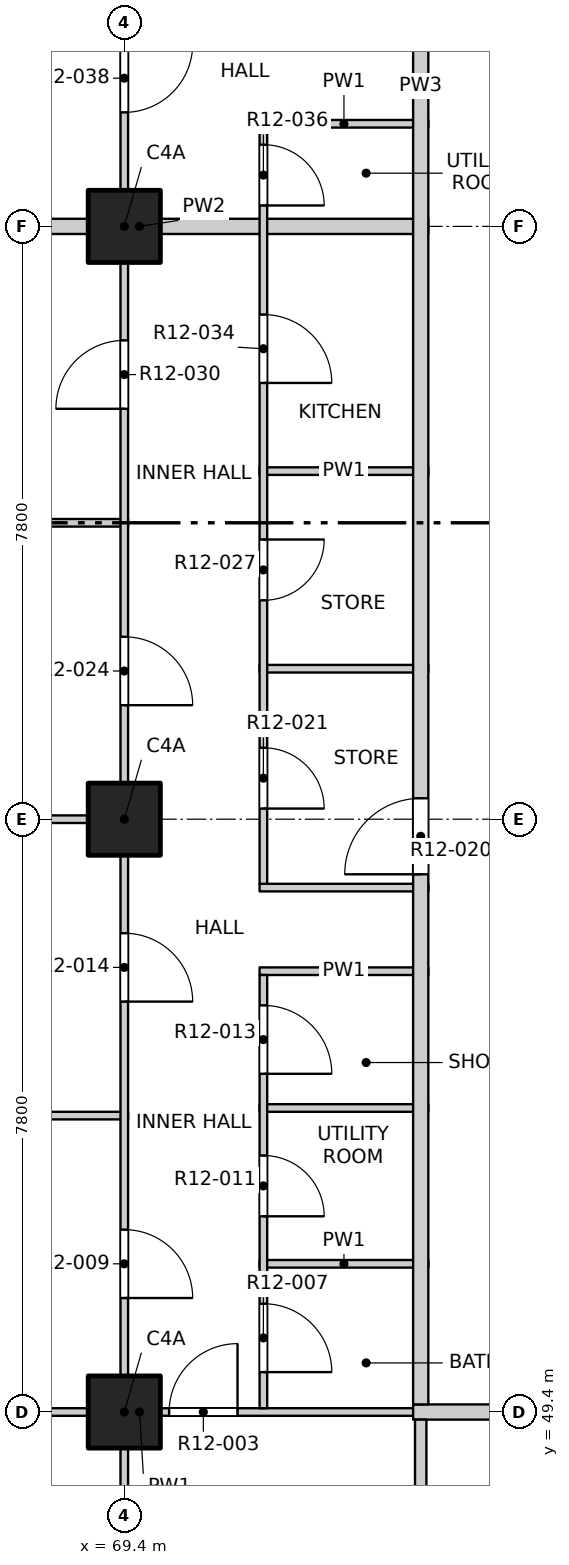
"""IFC4 building model, lengths in metres.
Left out: names, types, materials, properties, quantities, classifications, styles, units other than length and angle.
Written with IfcOpenShell. Run it as: python <this file> out.ifc"""

import sys

from ifc_helpers import new_model, si_unit, direction, frame, frame_2d, origin, origin_2d, place, context, subcontext, project, spatial, rectangle, extrude, element, fill, save


model = new_model("IFC4")
c1 = context("Model", 3, precision=1e-05, world=origin(), true_north=direction((0.0, 1.0)))
c2 = subcontext(c1, "Body", "Model", "MODEL_VIEW")
j1 = project(units=[si_unit("LENGTHUNIT", "METRE"), si_unit("PLANEANGLEUNIT", "RADIAN")], contexts=[c1])
p1 = place(None, origin())
s1 = spatial("IfcSite", under=j1, at=p1, CompositionType="ELEMENT")
p2 = place(p1, origin())
s2 = spatial("IfcBuilding", under=s1, at=p2, CompositionType="ELEMENT")
p3 = place(p2, frame((0.0, 0.0, 137.3)))
s3 = spatial("IfcBuildingStorey", under=s2, at=p3, CompositionType="ELEMENT", Elevation=137.3)
for number, where, z_axis, x_axis in (
    (1, (69.4, 49.4, -0.25), (0.0, 0.0, 1.0), (1.0, 0.0, 0.0)),
    (2, (69.4, 57.2, -0.25), (0.0, 0.0, 1.0), (1.0, 0.0, 0.0)),
    (3, (69.4, 65.0, -0.25), (0.0, 0.0, 1.0), (1.0, 0.0, 0.0)),
):
    element("IfcColumn", number, at=place(p3, frame(where, z_axis=z_axis, x_axis=x_axis)), inside=s3, PredefinedType="COLUMN", context=c2, shape_type="SweptSolid", body=[
        extrude(rectangle(XDim=0.95, YDim=0.95, at=origin_2d()), origin(), (0.0, 0.0, 1.0), 3.4),
    ])
p4 = place(p3, frame((65.8, 49.4, 0.0), z_axis=(0.0, 0.0, 1.0), x_axis=(1.0, 0.0, 0.0)))
e4 = element("IfcWall", 4, at=p4, inside=s3, PredefinedType="PARTITIONING", context=c2, shape_type="SweptSolid", body=[
    extrude(rectangle(XDim=7.6, YDim=0.1, at=frame_2d((3.8, 0.0))), origin(), (0.0, 0.0, 1.0), 3.15),
])
p5 = place(p4, frame((4.19, 0.0, 0.0)))
e5 = element("IfcOpeningElement", 5, at=p5, cuts=e4, PredefinedType="OPENING", context=c2, shape_type="SweptSolid", body=[
    extrude(rectangle(XDim=0.9, YDim=2.1, at=frame_2d((0.45, 1.05))), frame((0.0, 0.06, 0.0), z_axis=(0.0, -1.0, 0.0), x_axis=(1.0, 0.0, 0.0)), (0.0, 0.0, 1.0), 0.12),
])
p6 = place(p3, frame((73.2, 49.4, 0.0), z_axis=(0.0, 0.0, 1.0), x_axis=(1.0, 0.0, 0.0)))
e6 = element("IfcWall", 6, at=p6, inside=s3, PredefinedType="PARTITIONING", context=c2, shape_type="SweptSolid", body=[
    extrude(rectangle(XDim=23.6, YDim=0.2, at=frame_2d((11.8, 0.0))), origin(), (0.0, 0.0, 1.0), 3.15),
])
p7 = place(p6, frame((7.3, 0.0, 0.0)))
e7 = element("IfcOpeningElement", 7, at=p7, cuts=e6, PredefinedType="OPENING", context=c2, shape_type="SweptSolid", body=[
    extrude(rectangle(XDim=1.2, YDim=2.1, at=frame_2d((0.6, 1.05))), frame((0.0, 0.11, 0.0), z_axis=(0.0, -1.0, 0.0), x_axis=(1.0, 0.0, 0.0)), (0.0, 0.0, 1.0), 0.22),
])
p8 = place(p6, frame((17.825, 0.0, 0.0)))
e8 = element("IfcOpeningElement", 8, at=p8, cuts=e6, PredefinedType="OPENING", context=c2, shape_type="SweptSolid", body=[
    extrude(rectangle(XDim=1.2, YDim=2.1, at=frame_2d((0.6, 1.05))), frame((0.0, 0.11, 0.0), z_axis=(0.0, -1.0, 0.0), x_axis=(1.0, 0.0, 0.0)), (0.0, 0.0, 1.0), 0.22),
])
p9 = place(p3, frame((71.18, 51.35, 0.0), z_axis=(0.0, 0.0, 1.0), x_axis=(1.0, 0.0, 0.0)))
e9 = element("IfcWall", 9, at=p9, inside=s3, PredefinedType="PARTITIONING", context=c2, shape_type="SweptSolid", body=[
    extrude(rectangle(XDim=2.22, YDim=0.1, at=frame_2d((1.11, 0.0))), origin(), (0.0, 0.0, 1.0), 3.15),
])
p10 = place(p3, frame((65.8, 53.3, 0.0), z_axis=(0.0, 0.0, 1.0), x_axis=(1.0, 0.0, 0.0)))
e10 = element("IfcWall", 10, at=p10, inside=s3, PredefinedType="PARTITIONING", context=c2, shape_type="SweptSolid", body=[
    extrude(rectangle(XDim=3.65, YDim=0.1, at=frame_2d((1.825, 0.0))), origin(), (0.0, 0.0, 1.0), 3.15),
])
for number, where, z_axis, x_axis in (
    (11, (71.18, 53.4, 0.0), (0.0, 0.0, 1.0), (1.0, 0.0, 0.0)),
    (12, (71.18, 55.2, 0.0), (0.0, 0.0, 1.0), (1.0, 0.0, 0.0)),
    (13, (71.18, 56.3, 0.0), (0.0, 0.0, 1.0), (1.0, 0.0, 0.0)),
):
    element("IfcWall", number, at=place(p3, frame(where, z_axis=z_axis, x_axis=x_axis)), inside=s3, PredefinedType="PARTITIONING", context=c2, shape_type="SweptSolid", body=[
        extrude(rectangle(XDim=2.22, YDim=0.1, at=frame_2d((1.11, 0.0))), origin(), (0.0, 0.0, 1.0), 3.15),
    ])
p11 = place(p3, frame((65.8, 57.2, 0.0), z_axis=(0.0, 0.0, 1.0), x_axis=(1.0, 0.0, 0.0)))
e14 = element("IfcWall", 14, at=p11, inside=s3, PredefinedType="PARTITIONING", context=c2, shape_type="SweptSolid", body=[
    extrude(rectangle(XDim=3.65, YDim=0.1, at=frame_2d((1.825, 0.0))), origin(), (0.0, 0.0, 1.0), 3.15),
])
p12 = place(p3, frame((71.18, 59.18, 0.0), z_axis=(0.0, 0.0, 1.0), x_axis=(1.0, 0.0, 0.0)))
e15 = element("IfcWall", 15, at=p12, inside=s3, PredefinedType="PARTITIONING", context=c2, shape_type="SweptSolid", body=[
    extrude(rectangle(XDim=2.22, YDim=0.1, at=frame_2d((1.11, 0.0))), origin(), (0.0, 0.0, 1.0), 3.15),
])
p13 = place(p3, frame((65.8, 61.1, 0.0), z_axis=(0.0, 0.0, 1.0), x_axis=(1.0, 0.0, 0.0)))
e16 = element("IfcWall", 16, at=p13, inside=s3, PredefinedType="PARTITIONING", context=c2, shape_type="SweptSolid", body=[
    extrude(rectangle(XDim=3.65, YDim=0.1, at=frame_2d((1.825, 0.0))), origin(), (0.0, 0.0, 1.0), 2.55),
])
p14 = place(p3, frame((71.18, 61.78, 0.0), z_axis=(0.0, 0.0, 1.0), x_axis=(1.0, 0.0, 0.0)))
e17 = element("IfcWall", 17, at=p14, inside=s3, PredefinedType="PARTITIONING", context=c2, shape_type="SweptSolid", body=[
    extrude(rectangle(XDim=2.22, YDim=0.1, at=frame_2d((1.11, 0.0))), origin(), (0.0, 0.0, 1.0), 3.15),
])
p15 = place(p3, frame((65.8, 65.0, 0.0), z_axis=(0.0, 0.0, 1.0), x_axis=(1.0, 0.0, 0.0)))
e18 = element("IfcWall", 18, at=p15, inside=s3, PredefinedType="PARTITIONING", context=c2, shape_type="SweptSolid", body=[
    extrude(rectangle(XDim=7.6, YDim=0.2, at=frame_2d((3.8, 0.0))), origin(), (0.0, 0.0, 1.0), 3.15),
])
p16 = place(p3, frame((71.18, 66.35, 0.0), z_axis=(0.0, 0.0, 1.0), x_axis=(1.0, 0.0, 0.0)))
e19 = element("IfcWall", 19, at=p16, inside=s3, PredefinedType="PARTITIONING", context=c2, shape_type="SweptSolid", body=[
    extrude(rectangle(XDim=2.22, YDim=0.1, at=frame_2d((1.11, 0.0))), origin(), (0.0, 0.0, 1.0), 3.15),
])
p17 = place(p3, frame((69.4, 45.8, 0.0), z_axis=(0.0, 0.0, 1.0), x_axis=(0.0, 1.0, 0.0)))
e20 = element("IfcWall", 20, at=p17, inside=s3, PredefinedType="PARTITIONING", context=c2, shape_type="SweptSolid", body=[
    extrude(rectangle(XDim=38.4, YDim=0.1, at=frame_2d((19.2, 0.0))), origin(), (0.0, 0.0, 1.0), 3.15),
])
p18 = place(p17, frame((1.05, 0.0, 0.0)))
e21 = element("IfcOpeningElement", 21, at=p18, cuts=e20, PredefinedType="OPENING", context=c2, shape_type="SweptSolid", body=[
    extrude(rectangle(XDim=1.2, YDim=2.1, at=frame_2d((0.6, 1.05))), frame((0.0, 0.06, 0.0), z_axis=(0.0, -1.0, 0.0), x_axis=(1.0, 0.0, 0.0)), (0.0, 0.0, 1.0), 0.12),
])
p19 = place(p17, frame((5.1, 0.0, 0.0)))
e22 = element("IfcOpeningElement", 22, at=p19, cuts=e20, PredefinedType="OPENING", context=c2, shape_type="SweptSolid", body=[
    extrude(rectangle(XDim=0.9, YDim=2.1, at=frame_2d((0.45, 1.05))), frame((0.0, 0.06, 0.0), z_axis=(0.0, -1.0, 0.0), x_axis=(1.0, 0.0, 0.0)), (0.0, 0.0, 1.0), 0.12),
])
p20 = place(p17, frame((9.0, 0.0, 0.0)))
e23 = element("IfcOpeningElement", 23, at=p20, cuts=e20, PredefinedType="OPENING", context=c2, shape_type="SweptSolid", body=[
    extrude(rectangle(XDim=0.9, YDim=2.1, at=frame_2d((0.45, 1.05))), frame((0.0, 0.06, 0.0), z_axis=(0.0, -1.0, 0.0), x_axis=(1.0, 0.0, 0.0)), (0.0, 0.0, 1.0), 0.12),
])
p21 = place(p17, frame((12.9, 0.0, 0.0)))
e24 = element("IfcOpeningElement", 24, at=p21, cuts=e20, PredefinedType="OPENING", context=c2, shape_type="SweptSolid", body=[
    extrude(rectangle(XDim=0.9, YDim=2.1, at=frame_2d((0.45, 1.05))), frame((0.0, 0.06, 0.0), z_axis=(0.0, -1.0, 0.0), x_axis=(1.0, 0.0, 0.0)), (0.0, 0.0, 1.0), 0.12),
])
p22 = place(p17, frame((16.8, 0.0, 0.0)))
e25 = element("IfcOpeningElement", 25, at=p22, cuts=e20, PredefinedType="OPENING", context=c2, shape_type="SweptSolid", body=[
    extrude(rectangle(XDim=0.9, YDim=2.1, at=frame_2d((0.45, 1.05))), frame((0.0, 0.06, 0.0), z_axis=(0.0, -1.0, 0.0), x_axis=(1.0, 0.0, 0.0)), (0.0, 0.0, 1.0), 0.12),
])
p23 = place(p17, frame((20.7, 0.0, 0.0)))
e26 = element("IfcOpeningElement", 26, at=p23, cuts=e20, PredefinedType="OPENING", context=c2, shape_type="SweptSolid", body=[
    extrude(rectangle(XDim=0.9, YDim=2.1, at=frame_2d((0.45, 1.05))), frame((0.0, 0.06, 0.0), z_axis=(0.0, -1.0, 0.0), x_axis=(1.0, 0.0, 0.0)), (0.0, 0.0, 1.0), 0.12),
])
p24 = place(p17, frame((24.6, 0.0, 0.0)))
e27 = element("IfcOpeningElement", 27, at=p24, cuts=e20, PredefinedType="OPENING", context=c2, shape_type="SweptSolid", body=[
    extrude(rectangle(XDim=0.9, YDim=2.1, at=frame_2d((0.45, 1.05))), frame((0.0, 0.06, 0.0), z_axis=(0.0, -1.0, 0.0), x_axis=(1.0, 0.0, 0.0)), (0.0, 0.0, 1.0), 0.12),
])
p25 = place(p17, frame((28.5, 0.0, 0.0)))
e28 = element("IfcOpeningElement", 28, at=p25, cuts=e20, PredefinedType="OPENING", context=c2, shape_type="SweptSolid", body=[
    extrude(rectangle(XDim=0.9, YDim=2.1, at=frame_2d((0.45, 1.05))), frame((0.0, 0.06, 0.0), z_axis=(0.0, -1.0, 0.0), x_axis=(1.0, 0.0, 0.0)), (0.0, 0.0, 1.0), 0.12),
])
p26 = place(p17, frame((32.4, 0.0, 0.0)))
e29 = element("IfcOpeningElement", 29, at=p26, cuts=e20, PredefinedType="OPENING", context=c2, shape_type="SweptSolid", body=[
    extrude(rectangle(XDim=0.9, YDim=2.1, at=frame_2d((0.45, 1.05))), frame((0.0, 0.06, 0.0), z_axis=(0.0, -1.0, 0.0), x_axis=(1.0, 0.0, 0.0)), (0.0, 0.0, 1.0), 0.12),
])
p27 = place(p17, frame((36.15, 0.0, 0.0)))
e30 = element("IfcOpeningElement", 30, at=p27, cuts=e20, PredefinedType="OPENING", context=c2, shape_type="SweptSolid", body=[
    extrude(rectangle(XDim=1.2, YDim=2.1, at=frame_2d((0.6, 1.05))), frame((0.0, 0.06, 0.0), z_axis=(0.0, -1.0, 0.0), x_axis=(1.0, 0.0, 0.0)), (0.0, 0.0, 1.0), 0.12),
])
p28 = place(p3, frame((71.23, 49.45, 0.0), z_axis=(0.0, 0.0, 1.0), x_axis=(0.0, 1.0, 0.0)))
e31 = element("IfcWall", 31, at=p28, inside=s3, PredefinedType="PARTITIONING", context=c2, shape_type="SweptSolid", body=[
    extrude(rectangle(XDim=5.7, YDim=0.1, at=frame_2d((2.85, 0.0))), origin(), (0.0, 0.0, 1.0), 3.15),
])
p29 = place(p28, frame((0.475, 0.0, 0.0)))
e32 = element("IfcOpeningElement", 32, at=p29, cuts=e31, PredefinedType="OPENING", context=c2, shape_type="SweptSolid", body=[
    extrude(rectangle(XDim=0.9, YDim=2.1, at=frame_2d((0.45, 1.05))), frame((0.0, 0.06, 0.0), z_axis=(0.0, -1.0, 0.0), x_axis=(1.0, 0.0, 0.0)), (0.0, 0.0, 1.0), 0.12),
])
p30 = place(p28, frame((2.525, 0.0, 0.0)))
e33 = element("IfcOpeningElement", 33, at=p30, cuts=e31, PredefinedType="OPENING", context=c2, shape_type="SweptSolid", body=[
    extrude(rectangle(XDim=0.8, YDim=2.1, at=frame_2d((0.4, 1.05))), frame((0.0, 0.06, 0.0), z_axis=(0.0, -1.0, 0.0), x_axis=(1.0, 0.0, 0.0)), (0.0, 0.0, 1.0), 0.12),
])
p31 = place(p28, frame((4.4, 0.0, 0.0)))
e34 = element("IfcOpeningElement", 34, at=p31, cuts=e31, PredefinedType="OPENING", context=c2, shape_type="SweptSolid", body=[
    extrude(rectangle(XDim=0.9, YDim=2.1, at=frame_2d((0.45, 1.05))), frame((0.0, 0.06, 0.0), z_axis=(0.0, -1.0, 0.0), x_axis=(1.0, 0.0, 0.0)), (0.0, 0.0, 1.0), 0.12),
])
p32 = place(p3, frame((71.23, 56.35, 0.0), z_axis=(0.0, 0.0, 1.0), x_axis=(0.0, 1.0, 0.0)))
e35 = element("IfcWall", 35, at=p32, inside=s3, PredefinedType="PARTITIONING", context=c2, shape_type="SweptSolid", body=[
    extrude(rectangle(XDim=9.95, YDim=0.1, at=frame_2d((4.975, 0.0))), origin(), (0.0, 0.0, 1.0), 3.15),
])
p33 = place(p32, frame((0.99, 0.0, 0.0)))
e36 = element("IfcOpeningElement", 36, at=p33, cuts=e35, PredefinedType="OPENING", context=c2, shape_type="SweptSolid", body=[
    extrude(rectangle(XDim=0.8, YDim=2.1, at=frame_2d((0.4, 1.05))), frame((0.0, 0.06, 0.0), z_axis=(0.0, -1.0, 0.0), x_axis=(1.0, 0.0, 0.0)), (0.0, 0.0, 1.0), 0.12),
])
p34 = place(p32, frame((3.73, 0.0, 0.0)))
e37 = element("IfcOpeningElement", 37, at=p34, cuts=e35, PredefinedType="OPENING", context=c2, shape_type="SweptSolid", body=[
    extrude(rectangle(XDim=0.8, YDim=2.1, at=frame_2d((0.4, 1.05))), frame((0.0, 0.06, 0.0), z_axis=(0.0, -1.0, 0.0), x_axis=(1.0, 0.0, 0.0)), (0.0, 0.0, 1.0), 0.12),
])
p35 = place(p32, frame((6.59, 0.0, 0.0)))
e38 = element("IfcOpeningElement", 38, at=p35, cuts=e35, PredefinedType="OPENING", context=c2, shape_type="SweptSolid", body=[
    extrude(rectangle(XDim=0.9, YDim=2.1, at=frame_2d((0.45, 1.05))), frame((0.0, 0.06, 0.0), z_axis=(0.0, -1.0, 0.0), x_axis=(1.0, 0.0, 0.0)), (0.0, 0.0, 1.0), 0.12),
])
p36 = place(p32, frame((8.925, 0.0, 0.0)))
e39 = element("IfcOpeningElement", 39, at=p36, cuts=e35, PredefinedType="OPENING", context=c2, shape_type="SweptSolid", body=[
    extrude(rectangle(XDim=0.8, YDim=2.1, at=frame_2d((0.4, 1.05))), frame((0.0, 0.06, 0.0), z_axis=(0.0, -1.0, 0.0), x_axis=(1.0, 0.0, 0.0)), (0.0, 0.0, 1.0), 0.12),
])
p37 = place(p3, frame((73.3, 45.8, 0.0), z_axis=(0.0, 0.0, 1.0), x_axis=(0.0, 1.0, 0.0)))
e40 = element("IfcWall", 40, at=p37, inside=s3, PredefinedType="PARTITIONING", context=c2, shape_type="SweptSolid", body=[
    extrude(rectangle(XDim=3.5, YDim=0.15, at=frame_2d((1.75, 0.0))), origin(), (0.0, 0.0, 1.0), 3.15),
])
p38 = place(p3, frame((73.3, 49.5, 0.0), z_axis=(0.0, 0.0, 1.0), x_axis=(0.0, 1.0, 0.0)))
e41 = element("IfcWall", 41, at=p38, inside=s3, PredefinedType="PARTITIONING", context=c2, shape_type="SweptSolid", body=[
    extrude(rectangle(XDim=34.7, YDim=0.2, at=frame_2d((17.35, 0.0))), origin(), (0.0, 0.0, 1.0), 3.15),
])
p39 = place(p38, frame((6.975, 0.0, 0.0)))
e42 = element("IfcOpeningElement", 42, at=p39, cuts=e41, PredefinedType="OPENING", context=c2, shape_type="SweptSolid", body=[
    extrude(rectangle(XDim=1.0, YDim=2.1, at=frame_2d((0.5, 1.05))), frame((0.0, 0.11, 0.0), z_axis=(0.0, -1.0, 0.0), x_axis=(1.0, 0.0, 0.0)), (0.0, 0.0, 1.0), 0.22),
])
p40 = place(p38, frame((18.125, 0.0, 0.0)))
e43 = element("IfcOpeningElement", 43, at=p40, cuts=e41, PredefinedType="OPENING", context=c2, shape_type="SweptSolid", body=[
    extrude(rectangle(XDim=1.0, YDim=2.1, at=frame_2d((0.5, 1.05))), frame((0.0, 0.11, 0.0), z_axis=(0.0, -1.0, 0.0), x_axis=(1.0, 0.0, 0.0)), (0.0, 0.0, 1.0), 0.22),
])
p41 = place(p5, origin())
e44 = element("IfcDoor", 44, at=p41, inside=s3, OperationType="SINGLE_SWING_RIGHT", PredefinedType="DOOR", context=c2, shape_type="SweptSolid", body=[
    extrude(rectangle(XDim=0.9, YDim=2.1, at=frame_2d((0.45, 1.05))), frame((0.0, 0.025, 0.0), z_axis=(0.0, -1.0, 0.0), x_axis=(1.0, 0.0, 0.0)), (0.0, 0.0, 1.0), 0.05),
])
fill(e5, e44)
p42 = place(p29, origin())
e45 = element("IfcDoor", 45, at=p42, inside=s3, OperationType="SINGLE_SWING_RIGHT", PredefinedType="DOOR", context=c2, shape_type="SweptSolid", body=[
    extrude(rectangle(XDim=0.9, YDim=2.1, at=frame_2d((0.45, 1.05))), frame((0.0, 0.025, 0.0), z_axis=(0.0, -1.0, 0.0), x_axis=(1.0, 0.0, 0.0)), (0.0, 0.0, 1.0), 0.05),
])
fill(e32, e45)
p43 = place(p19, origin())
e46 = element("IfcDoor", 46, at=p43, inside=s3, OperationType="SINGLE_SWING_RIGHT", PredefinedType="DOOR", context=c2, shape_type="SweptSolid", body=[
    extrude(rectangle(XDim=0.9, YDim=2.1, at=frame_2d((0.45, 1.05))), frame((0.0, 0.025, 0.0), z_axis=(0.0, -1.0, 0.0), x_axis=(1.0, 0.0, 0.0)), (0.0, 0.0, 1.0), 0.05),
])
fill(e22, e46)
p44 = place(p30, origin())
e47 = element("IfcDoor", 47, at=p44, inside=s3, OperationType="SINGLE_SWING_RIGHT", PredefinedType="DOOR", context=c2, shape_type="SweptSolid", body=[
    extrude(rectangle(XDim=0.8, YDim=2.1, at=frame_2d((0.4, 1.05))), frame((0.0, 0.025, 0.0), z_axis=(0.0, -1.0, 0.0), x_axis=(1.0, 0.0, 0.0)), (0.0, 0.0, 1.0), 0.05),
])
fill(e33, e47)
p45 = place(p31, origin())
e48 = element("IfcDoor", 48, at=p45, inside=s3, OperationType="SINGLE_SWING_RIGHT", PredefinedType="DOOR", context=c2, shape_type="SweptSolid", body=[
    extrude(rectangle(XDim=0.9, YDim=2.1, at=frame_2d((0.45, 1.05))), frame((0.0, 0.025, 0.0), z_axis=(0.0, -1.0, 0.0), x_axis=(1.0, 0.0, 0.0)), (0.0, 0.0, 1.0), 0.05),
])
fill(e34, e48)
p46 = place(p20, origin())
e49 = element("IfcDoor", 49, at=p46, inside=s3, OperationType="SINGLE_SWING_RIGHT", PredefinedType="DOOR", context=c2, shape_type="SweptSolid", body=[
    extrude(rectangle(XDim=0.9, YDim=2.1, at=frame_2d((0.45, 1.05))), frame((0.0, 0.025, 0.0), z_axis=(0.0, -1.0, 0.0), x_axis=(1.0, 0.0, 0.0)), (0.0, 0.0, 1.0), 0.05),
])
fill(e23, e49)
p47 = place(p39, origin())
e50 = element("IfcDoor", 50, at=p47, inside=s3, OperationType="SINGLE_SWING_RIGHT", PredefinedType="DOOR", context=c2, shape_type="SweptSolid", body=[
    extrude(rectangle(XDim=1.0, YDim=2.1, at=frame_2d((0.5, 1.05))), frame((0.0, 0.025, 0.0), z_axis=(0.0, -1.0, 0.0), x_axis=(1.0, 0.0, 0.0)), (0.0, 0.0, 1.0), 0.05),
])
fill(e42, e50)
p48 = place(p33, origin())
e51 = element("IfcDoor", 51, at=p48, inside=s3, OperationType="SINGLE_SWING_RIGHT", PredefinedType="DOOR", context=c2, shape_type="SweptSolid", body=[
    extrude(rectangle(XDim=0.8, YDim=2.1, at=frame_2d((0.4, 1.05))), frame((0.0, 0.025, 0.0), z_axis=(0.0, -1.0, 0.0), x_axis=(1.0, 0.0, 0.0)), (0.0, 0.0, 1.0), 0.05),
])
fill(e36, e51)
p49 = place(p21, origin())
e52 = element("IfcDoor", 52, at=p49, inside=s3, OperationType="SINGLE_SWING_RIGHT", PredefinedType="DOOR", context=c2, shape_type="SweptSolid", body=[
    extrude(rectangle(XDim=0.9, YDim=2.1, at=frame_2d((0.45, 1.05))), frame((0.0, 0.025, 0.0), z_axis=(0.0, -1.0, 0.0), x_axis=(1.0, 0.0, 0.0)), (0.0, 0.0, 1.0), 0.05),
])
fill(e24, e52)
p50 = place(p34, origin())
e53 = element("IfcDoor", 53, at=p50, inside=s3, OperationType="SINGLE_SWING_LEFT", PredefinedType="DOOR", context=c2, shape_type="SweptSolid", body=[
    extrude(rectangle(XDim=0.8, YDim=2.1, at=frame_2d((0.4, 1.05))), frame((0.0, 0.025, 0.0), z_axis=(0.0, -1.0, 0.0), x_axis=(1.0, 0.0, 0.0)), (0.0, 0.0, 1.0), 0.05),
])
fill(e37, e53)
p51 = place(p22, origin())
e54 = element("IfcDoor", 54, at=p51, inside=s3, OperationType="SINGLE_SWING_LEFT", PredefinedType="DOOR", context=c2, shape_type="SweptSolid", body=[
    extrude(rectangle(XDim=0.9, YDim=2.1, at=frame_2d((0.45, 1.05))), frame((0.0, 0.025, 0.0), z_axis=(0.0, -1.0, 0.0), x_axis=(1.0, 0.0, 0.0)), (0.0, 0.0, 1.0), 0.05),
])
fill(e25, e54)
p52 = place(p35, origin())
e55 = element("IfcDoor", 55, at=p52, inside=s3, OperationType="SINGLE_SWING_RIGHT", PredefinedType="DOOR", context=c2, shape_type="SweptSolid", body=[
    extrude(rectangle(XDim=0.9, YDim=2.1, at=frame_2d((0.45, 1.05))), frame((0.0, 0.025, 0.0), z_axis=(0.0, -1.0, 0.0), x_axis=(1.0, 0.0, 0.0)), (0.0, 0.0, 1.0), 0.05),
])
fill(e38, e55)
p53 = place(p36, origin())
e56 = element("IfcDoor", 56, at=p53, inside=s3, OperationType="SINGLE_SWING_RIGHT", PredefinedType="DOOR", context=c2, shape_type="SweptSolid", body=[
    extrude(rectangle(XDim=0.8, YDim=2.1, at=frame_2d((0.4, 1.05))), frame((0.0, 0.025, 0.0), z_axis=(0.0, -1.0, 0.0), x_axis=(1.0, 0.0, 0.0)), (0.0, 0.0, 1.0), 0.05),
])
fill(e39, e56)
p54 = place(p23, origin())
e57 = element("IfcDoor", 57, at=p54, inside=s3, OperationType="SINGLE_SWING_LEFT", PredefinedType="DOOR", context=c2, shape_type="SweptSolid", body=[
    extrude(rectangle(XDim=0.9, YDim=2.1, at=frame_2d((0.45, 1.05))), frame((0.0, 0.025, 0.0), z_axis=(0.0, -1.0, 0.0), x_axis=(1.0, 0.0, 0.0)), (0.0, 0.0, 1.0), 0.05),
])
fill(e26, e57)
save(model, sys.argv[1])
